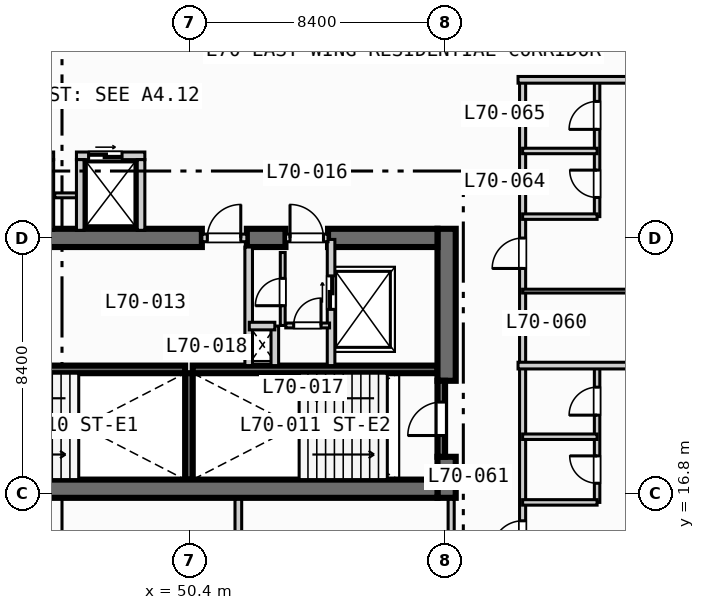
"""IFC4 building model, lengths in metres.
Left out: names, types, materials, properties, quantities, classifications, styles, units other than length and angle.
Written with IfcOpenShell. Run it as: python <this file> out.ifc"""

import sys

from ifc_helpers import new_model, si_unit, direction, frame, frame_2d, origin, place, context, subcontext, project, spatial, rectangle, extrude, element, fill, save


model = new_model("IFC4")
c1 = context("Model", 3, precision=1e-05, world=origin(), true_north=direction((0.0, 1.0)))
c2 = subcontext(c1, "Body", "Model", "MODEL_VIEW")
j1 = project(units=[si_unit("LENGTHUNIT", "METRE"), si_unit("PLANEANGLEUNIT", "RADIAN")], contexts=[c1])
p1 = place(None, origin())
s1 = spatial("IfcSite", under=j1, at=p1, CompositionType="ELEMENT")
p2 = place(p1, origin())
s2 = spatial("IfcBuilding", under=s1, at=p2, CompositionType="ELEMENT")
p3 = place(p2, frame((0.0, 0.0, 282.3)))
s3 = spatial("IfcBuildingStorey", under=s2, at=p3, CompositionType="ELEMENT", Elevation=282.3)
for number, where, z_axis, x_axis in (
    (1, (42.2, 20.875, 0.0), (0.0, 0.0, 1.0), (1.0, 0.0, 0.0)),
    (2, (50.5, 20.875, 0.0), (0.0, 0.0, 1.0), (1.0, 0.0, 0.0)),
):
    element("IfcWall", number, at=place(p3, frame(where, z_axis=z_axis, x_axis=x_axis)), inside=s3, PredefinedType="SOLIDWALL", context=c2, shape_type="SweptSolid", body=[
        extrude(rectangle(XDim=8.05, YDim=0.25, at=frame_2d((4.025, 0.0))), origin(), (0.0, 0.0, 1.0), 3.47),
    ])
p4 = place(p3, frame((50.375, 17.25, 0.0), z_axis=(0.0, 0.0, 1.0), x_axis=(0.0, 1.0, 0.0)))
e3 = element("IfcWall", 3, at=p4, inside=s3, PredefinedType="SOLIDWALL", context=c2, shape_type="SweptSolid", body=[
    extrude(rectangle(XDim=3.5, YDim=0.25, at=frame_2d((1.75, 0.0))), origin(), (0.0, 0.0, 1.0), 3.47),
])
p5 = place(p3, frame((58.85, 16.65, 0.0), z_axis=(0.0, 0.0, 1.0), x_axis=(0.0, 1.0, 0.0)))
e4 = element("IfcWall", 4, at=p5, inside=s3, PredefinedType="SHEAR", context=c2, shape_type="SweptSolid", body=[
    extrude(rectangle(XDim=1.35, YDim=0.6, at=frame_2d((0.675, 0.0))), origin(), (0.0, 0.0, 1.0), 3.47),
])
p6 = place(p3, frame((58.85, 20.5, 0.0), z_axis=(0.0, 0.0, 1.0), x_axis=(0.0, 1.0, 0.0)))
e5 = element("IfcWall", 5, at=p6, inside=s3, PredefinedType="SHEAR", context=c2, shape_type="SweptSolid", body=[
    extrude(rectangle(XDim=5.0, YDim=0.6, at=frame_2d((2.5, 0.0))), origin(), (0.0, 0.0, 1.0), 3.47),
])
p7 = place(p3, frame((42.2, 16.95, 0.0), z_axis=(0.0, 0.0, 1.0), x_axis=(1.0, 0.0, 0.0)))
e6 = element("IfcWall", 6, at=p7, inside=s3, PredefinedType="SHEAR", context=c2, shape_type="SweptSolid", body=[
    extrude(rectangle(XDim=16.35, YDim=0.6, at=frame_2d((8.175, 0.0))), origin(), (0.0, 0.0, 1.0), 3.47),
])
p8 = place(p3, frame((42.2, 25.2, 0.0), z_axis=(0.0, 0.0, 1.0), x_axis=(1.0, 0.0, 0.0)))
e7 = element("IfcWall", 7, at=p8, inside=s3, PredefinedType="SHEAR", context=c2, shape_type="SweptSolid", body=[
    extrude(rectangle(XDim=8.6, YDim=0.6, at=frame_2d((4.3, 0.0))), origin(), (0.0, 0.0, 1.0), 3.47),
])
p9 = place(p3, frame((52.28, 25.2, 0.0), z_axis=(0.0, 0.0, 1.0), x_axis=(1.0, 0.0, 0.0)))
e8 = element("IfcWall", 8, at=p9, inside=s3, PredefinedType="SHEAR", context=c2, shape_type="SweptSolid", body=[
    extrude(rectangle(XDim=1.27, YDim=0.6, at=frame_2d((0.635, 0.0))), origin(), (0.0, 0.0, 1.0), 3.47),
])
p10 = place(p3, frame((54.95, 25.2, 0.0), z_axis=(0.0, 0.0, 1.0), x_axis=(1.0, 0.0, 0.0)))
e9 = element("IfcWall", 9, at=p10, inside=s3, PredefinedType="SHEAR", context=c2, shape_type="SweptSolid", body=[
    extrude(rectangle(XDim=3.6, YDim=0.6, at=frame_2d((1.8, 0.0))), origin(), (0.0, 0.0, 1.0), 3.47),
])
p11 = place(p3, frame((58.675, 18.0, 0.0), z_axis=(0.0, 0.0, 1.0), x_axis=(0.0, 1.0, 0.0)))
e10 = element("IfcWall", 10, at=p11, inside=s3, PredefinedType="SOLIDWALL", context=c2, shape_type="SweptSolid", body=[
    extrude(rectangle(XDim=2.5, YDim=0.25, at=frame_2d((1.25, 0.0))), origin(), (0.0, 0.0, 1.0), 3.47),
])
p12 = place(p11, frame((0.7, 0.0, 0.0)))
e11 = element("IfcOpeningElement", 11, at=p12, cuts=e10, PredefinedType="OPENING", context=c2, shape_type="SweptSolid", body=[
    extrude(rectangle(XDim=1.1, YDim=2.15, at=frame_2d((0.55, 1.075))), frame((0.0, 0.135, 0.0), z_axis=(0.0, -1.0, 0.0), x_axis=(1.0, 0.0, 0.0)), (0.0, 0.0, 1.0), 0.27),
])
p13 = place(p3, frame((50.8, 25.2, 0.0), z_axis=(0.0, 0.0, 1.0), x_axis=(1.0, 0.0, 0.0)))
e12 = element("IfcWall", 12, at=p13, inside=s3, PredefinedType="SOLIDWALL", context=c2, shape_type="SweptSolid", body=[
    extrude(rectangle(XDim=1.48, YDim=0.25, at=frame_2d((0.74, 0.0))), origin(), (0.0, 0.0, 1.0), 3.47),
])
p14 = place(p13, frame((0.18, 0.0, 0.0)))
e13 = element("IfcOpeningElement", 13, at=p14, cuts=e12, PredefinedType="OPENING", context=c2, shape_type="SweptSolid", body=[
    extrude(rectangle(XDim=1.1, YDim=2.15, at=frame_2d((0.55, 1.075))), frame((0.0, 0.135, 0.0), z_axis=(0.0, -1.0, 0.0), x_axis=(1.0, 0.0, 0.0)), (0.0, 0.0, 1.0), 0.27),
])
p15 = place(p3, frame((52.34, 21.0, 0.0), z_axis=(0.0, 0.0, 1.0), x_axis=(0.0, 1.0, 0.0)))
e14 = element("IfcWall", 14, at=p15, inside=s3, PredefinedType="SOLIDWALL", context=c2, shape_type="SweptSolid", body=[
    extrude(rectangle(XDim=3.9, YDim=0.25, at=frame_2d((1.95, 0.0))), origin(), (0.0, 0.0, 1.0), 3.47),
])
p16 = place(p3, frame((55.05, 21.0, 0.0), z_axis=(0.0, 0.0, 1.0), x_axis=(0.0, 1.0, 0.0)))
e15 = element("IfcWall", 15, at=p16, inside=s3, PredefinedType="SOLIDWALL", context=c2, shape_type="SweptSolid", body=[
    extrude(rectangle(XDim=4.15, YDim=0.25, at=frame_2d((2.075, 0.0))), origin(), (0.0, 0.0, 1.0), 3.47),
])
p17 = place(p16, frame((1.85, 0.0, 0.0)))
e16 = element("IfcOpeningElement", 16, at=p17, cuts=e15, PredefinedType="OPENING", context=c2, shape_type="SweptSolid", body=[
    extrude(rectangle(XDim=1.1, YDim=2.15, at=frame_2d((0.55, 1.075))), frame((0.0, 0.135, 0.0), z_axis=(0.0, -1.0, 0.0), x_axis=(1.0, 0.0, 0.0)), (0.0, 0.0, 1.0), 0.27),
])
p18 = place(p3, frame((53.55, 25.2, 0.0), z_axis=(0.0, 0.0, 1.0), x_axis=(1.0, 0.0, 0.0)))
e17 = element("IfcWall", 17, at=p18, inside=s3, PredefinedType="SOLIDWALL", context=c2, shape_type="SweptSolid", body=[
    extrude(rectangle(XDim=1.4, YDim=0.25, at=frame_2d((0.7, 0.0))), origin(), (0.0, 0.0, 1.0), 3.47),
])
p19 = place(p18, frame((0.15, 0.0, 0.0)))
e18 = element("IfcOpeningElement", 18, at=p19, cuts=e17, PredefinedType="OPENING", context=c2, shape_type="SweptSolid", body=[
    extrude(rectangle(XDim=1.1, YDim=2.15, at=frame_2d((0.55, 1.075))), frame((0.0, 0.135, 0.0), z_axis=(0.0, -1.0, 0.0), x_axis=(1.0, 0.0, 0.0)), (0.0, 0.0, 1.0), 0.27),
])
p20 = place(p3, frame((53.2, 21.0, 0.0), z_axis=(0.0, 0.0, 1.0), x_axis=(0.0, 1.0, 0.0)))
e19 = element("IfcWall", 19, at=p20, inside=s3, PredefinedType="SOLIDWALL", context=c2, shape_type="SweptSolid", body=[
    extrude(rectangle(XDim=1.3, YDim=0.25, at=frame_2d((0.65, 0.0))), origin(), (0.0, 0.0, 1.0), 3.47),
])
p21 = place(p3, frame((52.36, 22.3, 0.0), z_axis=(0.0, 0.0, 1.0), x_axis=(1.0, 0.0, 0.0)))
e20 = element("IfcWall", 20, at=p21, inside=s3, PredefinedType="SOLIDWALL", context=c2, shape_type="SweptSolid", body=[
    extrude(rectangle(XDim=0.84, YDim=0.25, at=frame_2d((0.42, 0.0))), origin(), (0.0, 0.0, 1.0), 3.47),
])
p22 = place(p3, frame((53.56, 22.32, 0.0), z_axis=(0.0, 0.0, 1.0), x_axis=(1.0, 0.0, 0.0)))
e21 = element("IfcWall", 21, at=p22, inside=s3, PredefinedType="PARTITIONING", context=c2, shape_type="SweptSolid", body=[
    extrude(rectangle(XDim=1.44, YDim=0.16, at=frame_2d((0.72, 0.0))), origin(), (0.0, 0.0, 1.0), 3.47),
])
p23 = place(p22, frame((0.26, 0.0, 0.0)))
e22 = element("IfcOpeningElement", 22, at=p23, cuts=e21, PredefinedType="OPENING", context=c2, shape_type="SweptSolid", body=[
    extrude(rectangle(XDim=0.9, YDim=2.1, at=frame_2d((0.45, 1.05))), frame((0.0, 0.09, 0.0), z_axis=(0.0, -1.0, 0.0), x_axis=(1.0, 0.0, 0.0)), (0.0, 0.0, 1.0), 0.18),
])
p24 = place(p3, frame((53.46, 22.32, 0.0), z_axis=(0.0, 0.0, 1.0), x_axis=(0.0, 1.0, 0.0)))
e23 = element("IfcWall", 23, at=p24, inside=s3, PredefinedType="PARTITIONING", context=c2, shape_type="SweptSolid", body=[
    extrude(rectangle(XDim=2.4, YDim=0.16, at=frame_2d((1.2, 0.0))), origin(), (0.0, 0.0, 1.0), 3.47),
])
p25 = place(p24, frame((0.65, 0.0, 0.0)))
e24 = element("IfcOpeningElement", 24, at=p25, cuts=e23, PredefinedType="OPENING", context=c2, shape_type="SweptSolid", body=[
    extrude(rectangle(XDim=0.9, YDim=2.1, at=frame_2d((0.45, 1.05))), frame((0.0, 0.09, 0.0), z_axis=(0.0, -1.0, 0.0), x_axis=(1.0, 0.0, 0.0)), (0.0, 0.0, 1.0), 0.18),
])
p26 = place(p3, frame((43.675, 27.9, 0.0), z_axis=(0.0, 0.0, 1.0), x_axis=(1.0, 0.0, 0.0)))
e25 = element("IfcWall", 25, at=p26, inside=s3, PredefinedType="SOLIDWALL", context=c2, shape_type="SweptSolid", body=[
    extrude(rectangle(XDim=2.25, YDim=0.25, at=frame_2d((1.125, 0.0))), origin(), (0.0, 0.0, 1.0), 3.47),
])
p27 = place(p26, frame((0.4, 0.0, 0.0)))
e26 = element("IfcOpeningElement", 26, at=p27, cuts=e25, PredefinedType="OPENING", context=c2, shape_type="SweptSolid", body=[
    extrude(rectangle(XDim=1.1, YDim=2.15, at=frame_2d((0.55, 1.075))), frame((0.0, 0.135, 0.0), z_axis=(0.0, -1.0, 0.0), x_axis=(1.0, 0.0, 0.0)), (0.0, 0.0, 1.0), 0.27),
])
p28 = place(p3, frame((45.8, 25.45, 0.0), z_axis=(0.0, 0.0, 1.0), x_axis=(0.0, 1.0, 0.0)))
e27 = element("IfcWall", 27, at=p28, inside=s3, PredefinedType="SOLIDWALL", context=c2, shape_type="SweptSolid", body=[
    extrude(rectangle(XDim=2.325, YDim=0.25, at=frame_2d((1.163, 0.0))), origin(), (0.0, 0.0, 1.0), 3.47),
])
p29 = place(p3, frame((45.96, 26.6, 0.0), z_axis=(0.0, 0.0, 1.0), x_axis=(1.0, 0.0, 0.0)))
e28 = element("IfcWall", 28, at=p29, inside=s3, PredefinedType="PARTITIONING", context=c2, shape_type="SweptSolid", body=[
    extrude(rectangle(XDim=0.88, YDim=0.16, at=frame_2d((0.44, 0.0))), origin(), (0.0, 0.0, 1.0), 3.47),
])
p30 = place(p3, frame((46.675, 27.9, 0.0), z_axis=(0.0, 0.0, 1.0), x_axis=(1.0, 0.0, 0.0)))
e29 = element("IfcWall", 29, at=p30, inside=s3, PredefinedType="SOLIDWALL", context=c2, shape_type="SweptSolid", body=[
    extrude(rectangle(XDim=2.25, YDim=0.25, at=frame_2d((1.125, 0.0))), origin(), (0.0, 0.0, 1.0), 3.47),
])
p31 = place(p30, frame((0.4, 0.0, 0.0)))
e30 = element("IfcOpeningElement", 30, at=p31, cuts=e29, PredefinedType="OPENING", context=c2, shape_type="SweptSolid", body=[
    extrude(rectangle(XDim=1.1, YDim=2.15, at=frame_2d((0.55, 1.075))), frame((0.0, 0.135, 0.0), z_axis=(0.0, -1.0, 0.0), x_axis=(1.0, 0.0, 0.0)), (0.0, 0.0, 1.0), 0.27),
])
for number, where, z_axis, x_axis in (
    (31, (46.8, 25.45, 0.0), (0.0, 0.0, 1.0), (0.0, 1.0, 0.0)),
    (32, (48.8, 25.45, 0.0), (0.0, 0.0, 1.0), (0.0, 1.0, 0.0)),
):
    element("IfcWall", number, at=place(p3, frame(where, z_axis=z_axis, x_axis=x_axis)), inside=s3, PredefinedType="SOLIDWALL", context=c2, shape_type="SweptSolid", body=[
        extrude(rectangle(XDim=2.325, YDim=0.25, at=frame_2d((1.163, 0.0))), origin(), (0.0, 0.0, 1.0), 3.47),
    ])
p32 = place(p3, frame((59.0, 8.65, 0.0), z_axis=(0.0, 0.0, 1.0), x_axis=(0.0, 1.0, 0.0)))
e33 = element("IfcWall", 33, at=p32, inside=s3, PredefinedType="PARTITIONING", context=c2, shape_type="SweptSolid", body=[
    extrude(rectangle(XDim=7.95, YDim=0.2, at=frame_2d((3.975, 0.0))), origin(), (0.0, 0.0, 1.0), 3.16),
])
p33 = place(p32, frame((2.2, 0.0, 0.0)))
e34 = element("IfcOpeningElement", 34, at=p33, cuts=e33, PredefinedType="OPENING", context=c2, shape_type="SweptSolid", body=[
    extrude(rectangle(XDim=0.92, YDim=2.1, at=frame_2d((0.46, 1.05))), frame((0.0, 0.11, 0.0), z_axis=(0.0, -1.0, 0.0), x_axis=(1.0, 0.0, 0.0)), (0.0, 0.0, 1.0), 0.22),
])
p34 = place(p3, frame((52.0, 8.65, 0.0), z_axis=(0.0, 0.0, 1.0), x_axis=(0.0, 1.0, 0.0)))
e35 = element("IfcWall", 35, at=p34, inside=s3, PredefinedType="PARTITIONING", context=c2, shape_type="SweptSolid", body=[
    extrude(rectangle(XDim=7.95, YDim=0.22, at=frame_2d((3.975, 0.0))), origin(), (0.0, 0.0, 1.0), 3.47),
])
p35 = place(p3, frame((61.35, 11.8, 0.0), z_axis=(0.0, 0.0, 1.0), x_axis=(0.0, 1.0, 0.0)))
e36 = element("IfcWall", 36, at=p35, inside=s3, PredefinedType="PARTITIONING", context=c2, shape_type="SweptSolid", body=[
    extrude(rectangle(XDim=18.6, YDim=0.2, at=frame_2d((9.3, 0.0))), origin(), (0.0, 0.0, 1.0), 3.47),
])
p36 = place(p35, frame((3.095, 0.0, 0.0)))
e37 = element("IfcOpeningElement", 37, at=p36, cuts=e36, PredefinedType="OPENING", context=c2, shape_type="SweptSolid", body=[
    extrude(rectangle(XDim=1.0, YDim=2.15, at=frame_2d((0.5, 1.075))), frame((0.0, 0.11, 0.0), z_axis=(0.0, -1.0, 0.0), x_axis=(1.0, 0.0, 0.0)), (0.0, 0.0, 1.0), 0.22),
])
p37 = place(p35, frame((12.395, 0.0, 0.0)))
e38 = element("IfcOpeningElement", 38, at=p37, cuts=e36, PredefinedType="OPENING", context=c2, shape_type="SweptSolid", body=[
    extrude(rectangle(XDim=1.0, YDim=2.15, at=frame_2d((0.5, 1.075))), frame((0.0, 0.11, 0.0), z_axis=(0.0, -1.0, 0.0), x_axis=(1.0, 0.0, 0.0)), (0.0, 0.0, 1.0), 0.22),
])
p38 = place(p3, frame((63.8, 16.5, 0.0), z_axis=(0.0, 0.0, 1.0), x_axis=(0.0, 1.0, 0.0)))
e39 = element("IfcWall", 39, at=p38, inside=s3, PredefinedType="PLUMBINGWALL", context=c2, shape_type="SweptSolid", body=[
    extrude(rectangle(XDim=4.5, YDim=0.18, at=frame_2d((2.25, 0.0))), origin(), (0.0, 0.0, 1.0), 3.47),
])
p39 = place(p38, frame((0.63, 0.0, 0.0)))
e40 = element("IfcOpeningElement", 40, at=p39, cuts=e39, PredefinedType="OPENING", context=c2, shape_type="SweptSolid", body=[
    extrude(rectangle(XDim=0.9, YDim=2.1, at=frame_2d((0.45, 1.05))), frame((0.0, 0.1, 0.0), z_axis=(0.0, -1.0, 0.0), x_axis=(1.0, 0.0, 0.0)), (0.0, 0.0, 1.0), 0.2),
])
p40 = place(p38, frame((2.87, 0.0, 0.0)))
e41 = element("IfcOpeningElement", 41, at=p40, cuts=e39, PredefinedType="OPENING", context=c2, shape_type="SweptSolid", body=[
    extrude(rectangle(XDim=0.92, YDim=2.1, at=frame_2d((0.46, 1.05))), frame((0.0, 0.1, 0.0), z_axis=(0.0, -1.0, 0.0), x_axis=(1.0, 0.0, 0.0)), (0.0, 0.0, 1.0), 0.2),
])
for number, where, z_axis, x_axis in (
    (42, (61.35, 16.5, 0.0), (0.0, 0.0, 1.0), (1.0, 0.0, 0.0)),
    (43, (61.35, 18.66, 0.0), (0.0, 0.0, 1.0), (1.0, 0.0, 0.0)),
):
    element("IfcWall", number, at=place(p3, frame(where, z_axis=z_axis, x_axis=x_axis)), inside=s3, PredefinedType="PLUMBINGWALL", context=c2, shape_type="SweptSolid", body=[
        extrude(rectangle(XDim=2.45, YDim=0.18, at=frame_2d((1.225, 0.0))), origin(), (0.0, 0.0, 1.0), 3.47),
    ])
p41 = place(p3, frame((61.2, 21.0, 0.0), z_axis=(0.0, 0.0, 1.0), x_axis=(1.0, 0.0, 0.0)))
e44 = element("IfcWall", 44, at=p41, inside=s3, PredefinedType="PARTITIONING", context=c2, shape_type="SweptSolid", body=[
    extrude(rectangle(XDim=14.2, YDim=0.22, at=frame_2d((7.1, 0.0))), origin(), (0.0, 0.0, 1.0), 3.47),
])
p42 = place(p3, frame((63.8, 25.9, 0.0), z_axis=(0.0, 0.0, 1.0), x_axis=(0.0, 1.0, 0.0)))
e45 = element("IfcWall", 45, at=p42, inside=s3, PredefinedType="PLUMBINGWALL", context=c2, shape_type="SweptSolid", body=[
    extrude(rectangle(XDim=4.5, YDim=0.18, at=frame_2d((2.25, 0.0))), origin(), (0.0, 0.0, 1.0), 3.47),
])
p43 = place(p42, frame((0.63, 0.0, 0.0)))
e46 = element("IfcOpeningElement", 46, at=p43, cuts=e45, PredefinedType="OPENING", context=c2, shape_type="SweptSolid", body=[
    extrude(rectangle(XDim=0.9, YDim=2.1, at=frame_2d((0.45, 1.05))), frame((0.0, 0.1, 0.0), z_axis=(0.0, -1.0, 0.0), x_axis=(1.0, 0.0, 0.0)), (0.0, 0.0, 1.0), 0.2),
])
p44 = place(p42, frame((2.87, 0.0, 0.0)))
e47 = element("IfcOpeningElement", 47, at=p44, cuts=e45, PredefinedType="OPENING", context=c2, shape_type="SweptSolid", body=[
    extrude(rectangle(XDim=0.92, YDim=2.1, at=frame_2d((0.46, 1.05))), frame((0.0, 0.1, 0.0), z_axis=(0.0, -1.0, 0.0), x_axis=(1.0, 0.0, 0.0)), (0.0, 0.0, 1.0), 0.2),
])
for number, where, z_axis, x_axis in (
    (48, (61.35, 25.9, 0.0), (0.0, 0.0, 1.0), (1.0, 0.0, 0.0)),
    (49, (61.35, 28.06, 0.0), (0.0, 0.0, 1.0), (1.0, 0.0, 0.0)),
):
    element("IfcWall", number, at=place(p3, frame(where, z_axis=z_axis, x_axis=x_axis)), inside=s3, PredefinedType="PLUMBINGWALL", context=c2, shape_type="SweptSolid", body=[
        extrude(rectangle(XDim=2.45, YDim=0.18, at=frame_2d((1.225, 0.0))), origin(), (0.0, 0.0, 1.0), 3.47),
    ])
p45 = place(p3, frame((61.35, 23.45, 0.0), z_axis=(0.0, 0.0, 1.0), x_axis=(1.0, 0.0, 0.0)))
e50 = element("IfcWall", 50, at=p45, inside=s3, PredefinedType="PARTITIONING", context=c2, shape_type="SweptSolid", body=[
    extrude(rectangle(XDim=13.87, YDim=0.125, at=frame_2d((6.935, 0.0))), origin(), (0.0, 0.0, 1.0), 3.47),
])
p46 = place(p45, frame((7.7, 0.0, 0.0)))
e51 = element("IfcOpeningElement", 51, at=p46, cuts=e50, PredefinedType="OPENING", context=c2, shape_type="SweptSolid", body=[
    extrude(rectangle(XDim=0.92, YDim=2.1, at=frame_2d((0.46, 1.05))), frame((0.0, 0.073, 0.0), z_axis=(0.0, -1.0, 0.0), x_axis=(1.0, 0.0, 0.0)), (0.0, 0.0, 1.0), 0.145),
])
p47 = place(p3, frame((61.2, 30.4, 0.0), z_axis=(0.0, 0.0, 1.0), x_axis=(1.0, 0.0, 0.0)))
e52 = element("IfcWall", 52, at=p47, inside=s3, PredefinedType="PARTITIONING", context=c2, shape_type="SweptSolid", body=[
    extrude(rectangle(XDim=10.98, YDim=0.22, at=frame_2d((5.49, 0.0))), origin(), (0.0, 0.0, 1.0), 3.47),
])
p48 = place(p12, origin())
e53 = element("IfcDoor", 53, at=p48, inside=s3, OperationType="SINGLE_SWING_LEFT", PredefinedType="DOOR", context=c2, shape_type="SweptSolid", body=[
    extrude(rectangle(XDim=1.1, YDim=2.15, at=frame_2d((0.55, 1.075))), frame((0.0, 0.025, 0.0), z_axis=(0.0, -1.0, 0.0), x_axis=(1.0, 0.0, 0.0)), (0.0, 0.0, 1.0), 0.05),
])
fill(e11, e53)
p49 = place(p14, origin())
e54 = element("IfcDoor", 54, at=p49, inside=s3, OperationType="SINGLE_SWING_RIGHT", PredefinedType="DOOR", context=c2, shape_type="SweptSolid", body=[
    extrude(rectangle(XDim=1.1, YDim=2.15, at=frame_2d((0.55, 1.075))), frame((0.0, 0.025, 0.0), z_axis=(0.0, -1.0, 0.0), x_axis=(1.0, 0.0, 0.0)), (0.0, 0.0, 1.0), 0.05),
])
fill(e13, e54)
p50 = place(p17, origin())
e55 = element("IfcDoor", 55, at=p50, inside=s3, OperationType="SLIDING_TO_LEFT", PredefinedType="DOOR", context=c2, shape_type="SweptSolid", body=[
    extrude(rectangle(XDim=1.1, YDim=2.15, at=frame_2d((0.55, 1.075))), frame((0.0, 0.025, 0.0), z_axis=(0.0, -1.0, 0.0), x_axis=(1.0, 0.0, 0.0)), (0.0, 0.0, 1.0), 0.05),
])
fill(e16, e55)
p51 = place(p19, origin())
e56 = element("IfcDoor", 56, at=p51, inside=s3, OperationType="SINGLE_SWING_LEFT", PredefinedType="DOOR", context=c2, shape_type="SweptSolid", body=[
    extrude(rectangle(XDim=1.1, YDim=2.15, at=frame_2d((0.55, 1.075))), frame((0.0, 0.025, 0.0), z_axis=(0.0, -1.0, 0.0), x_axis=(1.0, 0.0, 0.0)), (0.0, 0.0, 1.0), 0.05),
])
fill(e18, e56)
p52 = place(p23, origin())
e57 = element("IfcDoor", 57, at=p52, inside=s3, OperationType="SINGLE_SWING_RIGHT", PredefinedType="DOOR", context=c2, shape_type="SweptSolid", body=[
    extrude(rectangle(XDim=0.9, YDim=2.1, at=frame_2d((0.45, 1.05))), frame((0.0, 0.025, 0.0), z_axis=(0.0, -1.0, 0.0), x_axis=(1.0, 0.0, 0.0)), (0.0, 0.0, 1.0), 0.05),
])
fill(e22, e57)
p53 = place(p25, origin())
e58 = element("IfcDoor", 58, at=p53, inside=s3, OperationType="SINGLE_SWING_LEFT", PredefinedType="DOOR", context=c2, shape_type="SweptSolid", body=[
    extrude(rectangle(XDim=0.9, YDim=2.1, at=frame_2d((0.45, 1.05))), frame((0.0, 0.025, 0.0), z_axis=(0.0, -1.0, 0.0), x_axis=(1.0, 0.0, 0.0)), (0.0, 0.0, 1.0), 0.05),
])
fill(e24, e58)
p54 = place(p31, origin())
e59 = element("IfcDoor", 59, at=p54, inside=s3, OperationType="SLIDING_TO_LEFT", PredefinedType="DOOR", context=c2, shape_type="SweptSolid", body=[
    extrude(rectangle(XDim=1.1, YDim=2.15, at=frame_2d((0.55, 1.075))), frame((0.0, 0.025, 0.0), z_axis=(0.0, -1.0, 0.0), x_axis=(1.0, 0.0, 0.0)), (0.0, 0.0, 1.0), 0.05),
])
fill(e30, e59)
p55 = place(p36, origin())
e60 = element("IfcDoor", 60, at=p55, inside=s3, OperationType="SINGLE_SWING_LEFT", PredefinedType="DOOR", context=c2, shape_type="SweptSolid", body=[
    extrude(rectangle(XDim=1.0, YDim=2.15, at=frame_2d((0.5, 1.075))), frame((0.0, 0.025, 0.0), z_axis=(0.0, -1.0, 0.0), x_axis=(1.0, 0.0, 0.0)), (0.0, 0.0, 1.0), 0.05),
])
fill(e37, e60)
p56 = place(p37, origin())
e61 = element("IfcDoor", 61, at=p56, inside=s3, OperationType="SINGLE_SWING_LEFT", PredefinedType="DOOR", context=c2, shape_type="SweptSolid", body=[
    extrude(rectangle(XDim=1.0, YDim=2.15, at=frame_2d((0.5, 1.075))), frame((0.0, 0.025, 0.0), z_axis=(0.0, -1.0, 0.0), x_axis=(1.0, 0.0, 0.0)), (0.0, 0.0, 1.0), 0.05),
])
fill(e38, e61)
p57 = place(p39, origin())
e62 = element("IfcDoor", 62, at=p57, inside=s3, OperationType="SINGLE_SWING_RIGHT", PredefinedType="DOOR", context=c2, shape_type="SweptSolid", body=[
    extrude(rectangle(XDim=0.9, YDim=2.1, at=frame_2d((0.45, 1.05))), frame((0.0, 0.025, 0.0), z_axis=(0.0, -1.0, 0.0), x_axis=(1.0, 0.0, 0.0)), (0.0, 0.0, 1.0), 0.05),
])
fill(e40, e62)
p58 = place(p40, origin())
e63 = element("IfcDoor", 63, at=p58, inside=s3, OperationType="SINGLE_SWING_LEFT", PredefinedType="DOOR", context=c2, shape_type="SweptSolid", body=[
    extrude(rectangle(XDim=0.92, YDim=2.1, at=frame_2d((0.46, 1.05))), frame((0.0, 0.025, 0.0), z_axis=(0.0, -1.0, 0.0), x_axis=(1.0, 0.0, 0.0)), (0.0, 0.0, 1.0), 0.05),
])
fill(e41, e63)
p59 = place(p43, origin())
e64 = element("IfcDoor", 64, at=p59, inside=s3, OperationType="SINGLE_SWING_RIGHT", PredefinedType="DOOR", context=c2, shape_type="SweptSolid", body=[
    extrude(rectangle(XDim=0.9, YDim=2.1, at=frame_2d((0.45, 1.05))), frame((0.0, 0.025, 0.0), z_axis=(0.0, -1.0, 0.0), x_axis=(1.0, 0.0, 0.0)), (0.0, 0.0, 1.0), 0.05),
])
fill(e46, e64)
p60 = place(p44, origin())
e65 = element("IfcDoor", 65, at=p60, inside=s3, OperationType="SINGLE_SWING_LEFT", PredefinedType="DOOR", context=c2, shape_type="SweptSolid", body=[
    extrude(rectangle(XDim=0.92, YDim=2.1, at=frame_2d((0.46, 1.05))), frame((0.0, 0.025, 0.0), z_axis=(0.0, -1.0, 0.0), x_axis=(1.0, 0.0, 0.0)), (0.0, 0.0, 1.0), 0.05),
])
fill(e47, e65)
save(model, sys.argv[1])
